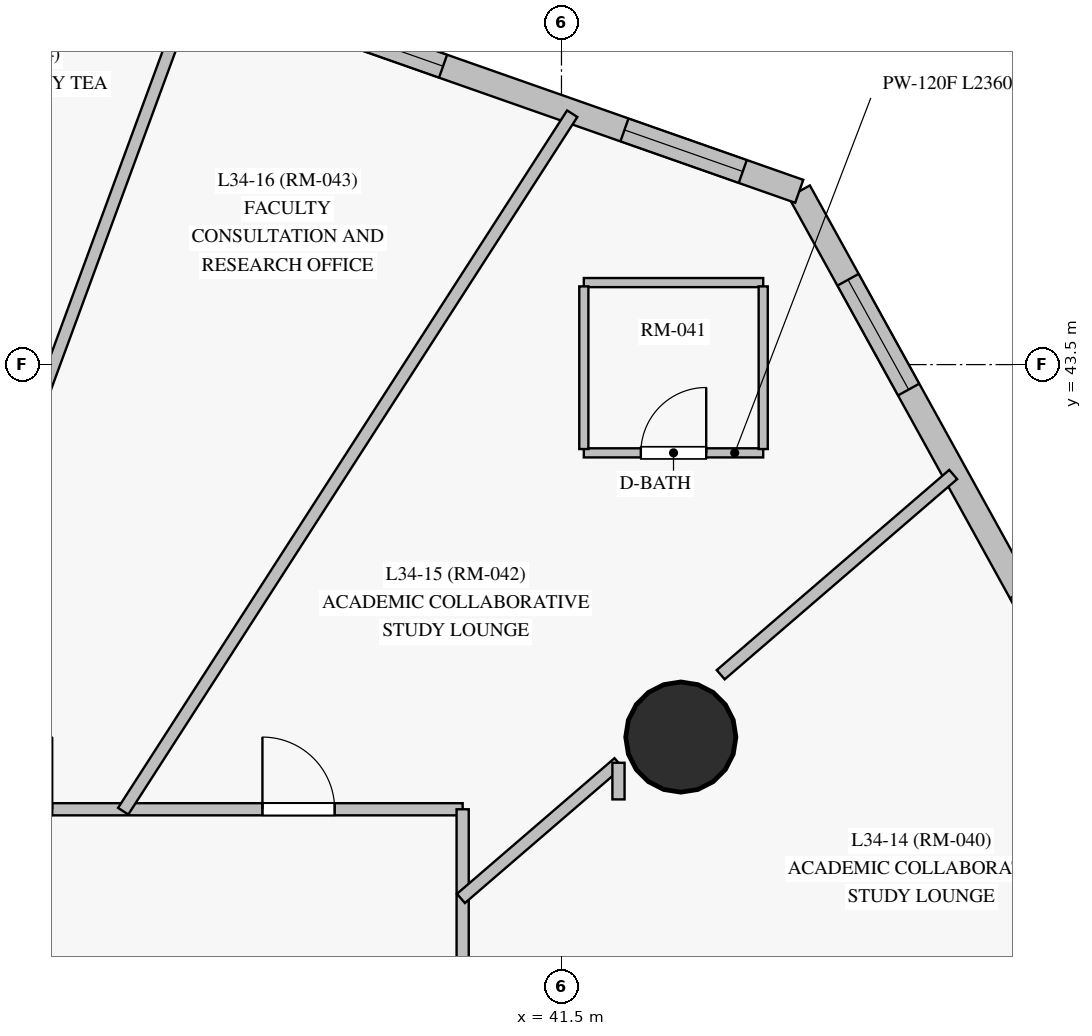
"""IFC4 building model, lengths in metres.
Left out: names, types, materials, properties, quantities, classifications, styles, units other than length and angle.
Written with IfcOpenShell. Run it as: python <this file> out.ifc"""

import sys

from ifc_helpers import new_model, si_unit, direction, frame, frame_2d, origin, origin_with_axes, origin_2d, place, context, subcontext, project, spatial, rectangle, circle, extrude, source, transform, mapped, element, fill, save


model = new_model("IFC4")
c1 = context("Model", 3, precision=1e-05, world=origin(), true_north=direction((0.0, 1.0)))
c2 = subcontext(c1, "Body", "Model", "MODEL_VIEW")
j1 = project(units=[si_unit("LENGTHUNIT", "METRE"), si_unit("PLANEANGLEUNIT", "RADIAN")], contexts=[c1])
p1 = place(None, origin())
s1 = spatial("IfcSite", under=j1, at=p1, CompositionType="ELEMENT")
p2 = place(p1, origin())
s2 = spatial("IfcBuilding", under=s1, at=p2, CompositionType="ELEMENT")
p3 = place(p2, frame((0.0, 0.0, 123.65)))
s3 = spatial("IfcBuildingStorey", under=s2, at=p3, CompositionType="ELEMENT", Elevation=123.65)
m1 = source(origin_with_axes(), c2, "Body", "SweptSolid", [
    extrude(circle(Radius=0.725, at=origin_2d()), origin(), (0.0, 0.0, 1.0), 3.05),
])
p4 = place(p3, frame((43.07, 38.6, 0.0), z_axis=(0.0, 0.0, 1.0), x_axis=(1.0, 0.0, 0.0)))
e1 = element("IfcColumn", 1, at=p4, inside=s3, PredefinedType="COLUMN", context=c2, shape_type="MappedRepresentation", body=[
    mapped(m1, transform((0.0, 0.0, 0.0), scale=1.0)),
])
p5 = place(p3, frame((45.867, 23.651, 0.0), z_axis=(0.0, 0.0, 1.0), x_axis=(0.236563917857, 0.97161592863, 0.0)))
e2 = element("IfcWall", 2, at=p5, inside=s3, PredefinedType="SOLIDWALL", context=c2, shape_type="SweptSolid", body=[
    extrude(rectangle(XDim=14.2, YDim=0.32, at=frame_2d((7.1, 0.0))), origin(), (0.0, 0.0, 1.0), 2.825),
])
p6 = place(p5, frame((2.641, 0.0, 0.85)))
e3 = element("IfcOpeningElement", 3, at=p6, cuts=e2, PredefinedType="OPENING", context=c2, shape_type="SweptSolid", body=[
    extrude(rectangle(XDim=1.65, YDim=1.65, at=frame_2d((0.825, 0.825))), frame((0.0, 0.17, 0.0), z_axis=(0.0, -1.0, 0.0), x_axis=(1.0, 0.0, 0.0)), (0.0, 0.0, 1.0), 0.34),
])
p7 = place(p5, frame((8.415, 0.0, 0.85)))
e4 = element("IfcOpeningElement", 4, at=p7, cuts=e2, PredefinedType="OPENING", context=c2, shape_type="SweptSolid", body=[
    extrude(rectangle(XDim=1.65, YDim=1.65, at=frame_2d((0.825, 0.825))), frame((0.0, 0.17, 0.0), z_axis=(0.0, -1.0, 0.0), x_axis=(1.0, 0.0, 0.0)), (0.0, 0.0, 1.0), 0.34),
])
p8 = place(p5, frame((12.049, 0.0, 0.85)))
e5 = element("IfcOpeningElement", 5, at=p8, cuts=e2, PredefinedType="OPENING", context=c2, shape_type="SweptSolid", body=[
    extrude(rectangle(XDim=1.65, YDim=1.65, at=frame_2d((0.825, 0.825))), frame((0.0, 0.17, 0.0), z_axis=(0.0, -1.0, 0.0), x_axis=(1.0, 0.0, 0.0)), (0.0, 0.0, 1.0), 0.34),
])
p9 = place(p3, frame((49.226, 37.448, 0.0), z_axis=(0.0, 0.0, 1.0), x_axis=(-0.483190594732, 0.875515190709, 0.0)))
e6 = element("IfcWall", 6, at=p9, inside=s3, PredefinedType="SOLIDWALL", context=c2, shape_type="SweptSolid", body=[
    extrude(rectangle(XDim=9.517, YDim=0.32, at=frame_2d((4.758, 0.0))), origin(), (0.0, 0.0, 1.0), 2.825),
])
p10 = place(p9, frame((1.839, 0.0, 0.85)))
e7 = element("IfcOpeningElement", 7, at=p10, cuts=e6, PredefinedType="OPENING", context=c2, shape_type="SweptSolid", body=[
    extrude(rectangle(XDim=1.65, YDim=1.65, at=frame_2d((0.825, 0.825))), frame((0.0, 0.17, 0.0), z_axis=(0.0, -1.0, 0.0), x_axis=(1.0, 0.0, 0.0)), (0.0, 0.0, 1.0), 0.34),
])
p11 = place(p9, frame((6.538, 0.0, 0.85)))
e8 = element("IfcOpeningElement", 8, at=p11, cuts=e6, PredefinedType="OPENING", context=c2, shape_type="SweptSolid", body=[
    extrude(rectangle(XDim=1.65, YDim=1.65, at=frame_2d((0.825, 0.825))), frame((0.0, 0.17, 0.0), z_axis=(0.0, -1.0, 0.0), x_axis=(1.0, 0.0, 0.0)), (0.0, 0.0, 1.0), 0.34),
])
p12 = place(p3, frame((44.628, 45.78, 0.0), z_axis=(0.0, 0.0, 1.0), x_axis=(-0.943484621609, 0.331416307366, 0.0)))
e9 = element("IfcWall", 9, at=p12, inside=s3, PredefinedType="SOLIDWALL", context=c2, shape_type="SweptSolid", body=[
    extrude(rectangle(XDim=11.884, YDim=0.32, at=frame_2d((5.942, 0.0))), origin(), (0.0, 0.0, 1.0), 2.825),
])
p13 = place(p12, frame((0.787, 0.0, 0.85)))
e10 = element("IfcOpeningElement", 10, at=p13, cuts=e9, PredefinedType="OPENING", context=c2, shape_type="SweptSolid", body=[
    extrude(rectangle(XDim=1.65, YDim=1.65, at=frame_2d((0.825, 0.825))), frame((0.0, 0.17, 0.0), z_axis=(0.0, -1.0, 0.0), x_axis=(1.0, 0.0, 0.0)), (0.0, 0.0, 1.0), 0.34),
])
p14 = place(p12, frame((4.966, 0.0, 0.85)))
e11 = element("IfcOpeningElement", 11, at=p14, cuts=e9, PredefinedType="OPENING", context=c2, shape_type="SweptSolid", body=[
    extrude(rectangle(XDim=1.65, YDim=1.65, at=frame_2d((0.825, 0.825))), frame((0.0, 0.17, 0.0), z_axis=(0.0, -1.0, 0.0), x_axis=(1.0, 0.0, 0.0)), (0.0, 0.0, 1.0), 0.34),
])
p15 = place(p12, frame((9.296, 0.0, 0.85)))
e12 = element("IfcOpeningElement", 12, at=p15, cuts=e9, PredefinedType="OPENING", context=c2, shape_type="SweptSolid", body=[
    extrude(rectangle(XDim=1.65, YDim=1.65, at=frame_2d((0.825, 0.825))), frame((0.0, 0.17, 0.0), z_axis=(0.0, -1.0, 0.0), x_axis=(1.0, 0.0, 0.0)), (0.0, 0.0, 1.0), 0.34),
])
p16 = place(p3, frame((16.7, 37.65, 0.0), z_axis=(0.0, 0.0, 1.0), x_axis=(1.0, 0.0, 0.0)))
e13 = element("IfcWall", 13, at=p16, inside=s3, PredefinedType="PARTITIONING", context=c2, shape_type="SweptSolid", body=[
    extrude(rectangle(XDim=23.5, YDim=0.16, at=frame_2d((11.75, 0.0))), origin(), (0.0, 0.0, 1.0), 2.325),
])
p17 = place(p16, frame((20.866, 0.0, 0.0)))
e14 = element("IfcOpeningElement", 14, at=p17, cuts=e13, PredefinedType="OPENING", context=c2, shape_type="SweptSolid", body=[
    extrude(rectangle(XDim=0.95, YDim=2.15, at=frame_2d((0.475, 1.075))), frame((0.0, 0.09, 0.0), z_axis=(0.0, -1.0, 0.0), x_axis=(1.0, 0.0, 0.0)), (0.0, 0.0, 1.0), 0.18),
])
p18 = place(p16, frame((17.15, 0.0, 0.0)))
e15 = element("IfcOpeningElement", 15, at=p18, cuts=e13, PredefinedType="OPENING", context=c2, shape_type="SweptSolid", body=[
    extrude(rectangle(XDim=0.95, YDim=2.15, at=frame_2d((0.475, 1.075))), frame((0.0, 0.09, 0.0), z_axis=(0.0, -1.0, 0.0), x_axis=(1.0, 0.0, 0.0)), (0.0, 0.0, 1.0), 0.18),
])
p19 = place(p16, frame((14.76, 0.0, 0.0)))
e16 = element("IfcOpeningElement", 16, at=p19, cuts=e13, PredefinedType="OPENING", context=c2, shape_type="SweptSolid", body=[
    extrude(rectangle(XDim=0.96, YDim=2.15, at=frame_2d((0.48, 1.075))), frame((0.0, 0.09, 0.0), z_axis=(0.0, -1.0, 0.0), x_axis=(1.0, 0.0, 0.0)), (0.0, 0.0, 1.0), 0.18),
])
p20 = place(p16, frame((11.275, 0.0, 0.0)))
e17 = element("IfcOpeningElement", 17, at=p20, cuts=e13, PredefinedType="OPENING", context=c2, shape_type="SweptSolid", body=[
    extrude(rectangle(XDim=0.95, YDim=2.15, at=frame_2d((0.475, 1.075))), frame((0.0, 0.09, 0.0), z_axis=(0.0, -1.0, 0.0), x_axis=(1.0, 0.0, 0.0)), (0.0, 0.0, 1.0), 0.18),
])
p21 = place(p16, frame((7.75, 0.0, 0.0)))
e18 = element("IfcOpeningElement", 18, at=p21, cuts=e13, PredefinedType="OPENING", context=c2, shape_type="SweptSolid", body=[
    extrude(rectangle(XDim=0.95, YDim=2.15, at=frame_2d((0.475, 1.075))), frame((0.0, 0.09, 0.0), z_axis=(0.0, -1.0, 0.0), x_axis=(1.0, 0.0, 0.0)), (0.0, 0.0, 1.0), 0.18),
])
p22 = place(p16, frame((4.96, 0.0, 0.0)))
e19 = element("IfcOpeningElement", 19, at=p22, cuts=e13, PredefinedType="OPENING", context=c2, shape_type="SweptSolid", body=[
    extrude(rectangle(XDim=0.95, YDim=2.15, at=frame_2d((0.475, 1.075))), frame((0.0, 0.09, 0.0), z_axis=(0.0, -1.0, 0.0), x_axis=(1.0, 0.0, 0.0)), (0.0, 0.0, 1.0), 0.18),
])
p23 = place(p3, frame((40.2, 37.65, 0.0), z_axis=(0.0, 0.0, 1.0), x_axis=(0.0, -1.0, 0.0)))
e20 = element("IfcWall", 20, at=p23, inside=s3, PredefinedType="PARTITIONING", context=c2, shape_type="SweptSolid", body=[
    extrude(rectangle(XDim=22.3, YDim=0.16, at=frame_2d((11.15, 0.0))), origin(), (0.0, 0.0, 1.0), 2.325),
])
p24 = place(p23, frame((14.02, 0.0, 0.0)))
e21 = element("IfcOpeningElement", 21, at=p24, cuts=e20, PredefinedType="OPENING", context=c2, shape_type="SweptSolid", body=[
    extrude(rectangle(XDim=0.96, YDim=2.15, at=frame_2d((0.48, 1.075))), frame((0.0, 0.09, 0.0), z_axis=(0.0, -1.0, 0.0), x_axis=(1.0, 0.0, 0.0)), (0.0, 0.0, 1.0), 0.18),
])
p25 = place(p23, frame((10.675, 0.0, 0.0)))
e22 = element("IfcOpeningElement", 22, at=p25, cuts=e20, PredefinedType="OPENING", context=c2, shape_type="SweptSolid", body=[
    extrude(rectangle(XDim=0.96, YDim=2.15, at=frame_2d((0.48, 1.075))), frame((0.0, 0.09, 0.0), z_axis=(0.0, -1.0, 0.0), x_axis=(1.0, 0.0, 0.0)), (0.0, 0.0, 1.0), 0.18),
])
p26 = place(p23, frame((7.33, 0.0, 0.0)))
e23 = element("IfcOpeningElement", 23, at=p26, cuts=e20, PredefinedType="OPENING", context=c2, shape_type="SweptSolid", body=[
    extrude(rectangle(XDim=0.95, YDim=2.15, at=frame_2d((0.475, 1.075))), frame((0.0, 0.09, 0.0), z_axis=(0.0, -1.0, 0.0), x_axis=(1.0, 0.0, 0.0)), (0.0, 0.0, 1.0), 0.18),
])
p27 = place(p23, frame((4.91, 0.0, 0.0)))
e24 = element("IfcOpeningElement", 24, at=p27, cuts=e20, PredefinedType="OPENING", context=c2, shape_type="SweptSolid", body=[
    extrude(rectangle(XDim=0.95, YDim=2.15, at=frame_2d((0.475, 1.075))), frame((0.0, 0.09, 0.0), z_axis=(0.0, -1.0, 0.0), x_axis=(1.0, 0.0, 0.0)), (0.0, 0.0, 1.0), 0.18),
])
p28 = place(p3, frame((32.657, 37.622, 0.0), z_axis=(0.0, 0.0, 1.0), x_axis=(0.345391402171, 0.938458725414, 0.0)))
e25 = element("IfcWall", 25, at=p28, inside=s3, PredefinedType="PARTITIONING", context=c2, shape_type="SweptSolid", body=[
    extrude(rectangle(XDim=11.64, YDim=0.16, at=frame_2d((5.82, 0.0))), origin(), (0.0, 0.0, 1.0), 2.825),
])
p29 = place(p3, frame((35.734, 37.625, 0.0), z_axis=(0.0, 0.0, 1.0), x_axis=(0.54132507633, 0.840813392933, 0.0)))
e26 = element("IfcWall", 26, at=p29, inside=s3, PredefinedType="PARTITIONING", context=c2, shape_type="SweptSolid", body=[
    extrude(rectangle(XDim=10.913, YDim=0.16, at=frame_2d((5.457, 0.0))), origin(), (0.0, 0.0, 1.0), 2.825),
])
p30 = place(p3, frame((43.595, 39.42, 0.0), z_axis=(0.0, 0.0, 1.0), x_axis=(0.757734743663, 0.6525626853, 0.0)))
e27 = element("IfcWall", 27, at=p30, inside=s3, PredefinedType="PARTITIONING", context=c2, shape_type="SweptSolid", body=[
    extrude(rectangle(XDim=4.037, YDim=0.16, at=frame_2d((2.019, 0.0))), origin(), (0.0, 0.0, 1.0), 2.825),
])
p31 = place(p3, frame((40.177, 36.477, 0.0), z_axis=(0.0, 0.0, 1.0), x_axis=(0.757761446907, 0.652531677071, 0.0)))
e28 = element("IfcWall", 28, at=p31, inside=s3, PredefinedType="PARTITIONING", context=c2, shape_type="SweptSolid", body=[
    extrude(rectangle(XDim=2.735, YDim=0.16, at=frame_2d((1.368, 0.0))), origin(), (0.0, 0.0, 1.0), 2.225),
])
p32 = place(p3, frame((41.794, 42.339, 0.0), z_axis=(0.0, 0.0, 1.0), x_axis=(1.0, 0.0, 0.0)))
e29 = element("IfcWall", 29, at=p32, inside=s3, PredefinedType="PARTITIONING", context=c2, shape_type="SweptSolid", body=[
    extrude(rectangle(XDim=2.36, YDim=0.12, at=frame_2d((1.18, 0.0))), origin(), (0.0, 0.0, 1.0), 2.825),
])
p33 = place(p32, frame((0.75, 0.0, 0.0)))
e30 = element("IfcOpeningElement", 30, at=p33, cuts=e29, PredefinedType="OPENING", context=c2, shape_type="SweptSolid", body=[
    extrude(rectangle(XDim=0.86, YDim=2.1, at=frame_2d((0.43, 1.05))), frame((0.0, 0.07, 0.0), z_axis=(0.0, -1.0, 0.0), x_axis=(1.0, 0.0, 0.0)), (0.0, 0.0, 1.0), 0.14),
])
p34 = place(p3, frame((44.154, 44.579, 0.0), z_axis=(0.0, 0.0, 1.0), x_axis=(-1.0, 0.0, 0.0)))
e31 = element("IfcWall", 31, at=p34, inside=s3, PredefinedType="PARTITIONING", context=c2, shape_type="SweptSolid", body=[
    extrude(rectangle(XDim=2.36, YDim=0.12, at=frame_2d((1.18, 0.0))), origin(), (0.0, 0.0, 1.0), 2.825),
])
for number, where, z_axis, x_axis in (
    (32, (44.154, 42.389, 0.0), (0.0, 0.0, 1.0), (0.0, 1.0, 0.0)),
    (33, (41.794, 44.529, 0.0), (0.0, 0.0, 1.0), (0.0, -1.0, 0.0)),
):
    element("IfcWall", number, at=place(p3, frame(where, z_axis=z_axis, x_axis=x_axis)), inside=s3, PredefinedType="PARTITIONING", context=c2, shape_type="SweptSolid", body=[
        extrude(rectangle(XDim=2.14, YDim=0.12, at=frame_2d((1.07, 0.0))), origin(), (0.0, 0.0, 1.0), 2.825),
    ])
p35 = place(p3, frame((42.25, 38.262, 0.0), z_axis=(0.0, 0.0, 1.0), x_axis=(0.0, -1.0, 0.0)))
e34 = element("IfcWall", 34, at=p35, inside=s3, PredefinedType="PARTITIONING", context=c2, shape_type="SweptSolid", body=[
    extrude(rectangle(XDim=0.482, YDim=0.16, at=frame_2d((0.241, 0.0))), origin(), (0.0, 0.0, 1.0), 2.325),
])
m2 = source(origin_with_axes(), c2, "Body", "SweptSolid", [
    extrude(rectangle(XDim=1.65, YDim=1.65, at=frame_2d((0.825, 0.825))), frame((0.0, 0.03, 0.0), z_axis=(0.0, -1.0, 0.0), x_axis=(1.0, 0.0, 0.0)), (0.0, 0.0, 1.0), 0.06),
])
p36 = place(p11, origin())
e35 = element("IfcWindow", 35, at=p36, inside=s3, PartitioningType="SINGLE_PANEL", PredefinedType="WINDOW", context=c2, shape_type="MappedRepresentation", body=[
    mapped(m2, transform((0.0, 0.0, 0.0), scale=1.0)),
])
fill(e8, e35)
p37 = place(p13, origin())
e36 = element("IfcWindow", 36, at=p37, inside=s3, PartitioningType="SINGLE_PANEL", PredefinedType="WINDOW", context=c2, shape_type="MappedRepresentation", body=[
    mapped(m2, transform((0.0, 0.0, 0.0), scale=1.0)),
])
fill(e10, e36)
p38 = place(p14, origin())
e37 = element("IfcWindow", 37, at=p38, inside=s3, PartitioningType="SINGLE_PANEL", PredefinedType="WINDOW", context=c2, shape_type="MappedRepresentation", body=[
    mapped(m2, transform((0.0, 0.0, 0.0), scale=1.0)),
])
fill(e11, e37)
m3 = source(origin_with_axes(), c2, "Body", "SweptSolid", [
    extrude(rectangle(XDim=0.86, YDim=2.1, at=frame_2d((0.43, 1.05))), frame((0.0, 0.025, 0.0), z_axis=(0.0, -1.0, 0.0), x_axis=(1.0, 0.0, 0.0)), (0.0, 0.0, 1.0), 0.05),
])
p39 = place(p33, origin())
e38 = element("IfcDoor", 38, at=p39, inside=s3, OperationType="SINGLE_SWING_RIGHT", PredefinedType="DOOR", context=c2, shape_type="MappedRepresentation", body=[
    mapped(m3, transform((0.0, 0.0, 0.0), scale=1.0)),
])
fill(e30, e38)
m4 = source(origin_with_axes(), c2, "Body", "SweptSolid", [
    extrude(rectangle(XDim=0.95, YDim=2.15, at=frame_2d((0.475, 1.075))), frame((0.0, 0.025, 0.0), z_axis=(0.0, -1.0, 0.0), x_axis=(1.0, 0.0, 0.0)), (0.0, 0.0, 1.0), 0.05),
])
p40 = place(p17, origin())
e39 = element("IfcDoor", 39, at=p40, inside=s3, OperationType="SINGLE_SWING_LEFT", PredefinedType="DOOR", context=c2, shape_type="MappedRepresentation", body=[
    mapped(m4, transform((0.0, 0.0, 0.0), scale=1.0)),
])
fill(e14, e39)
save(model, sys.argv[1])
